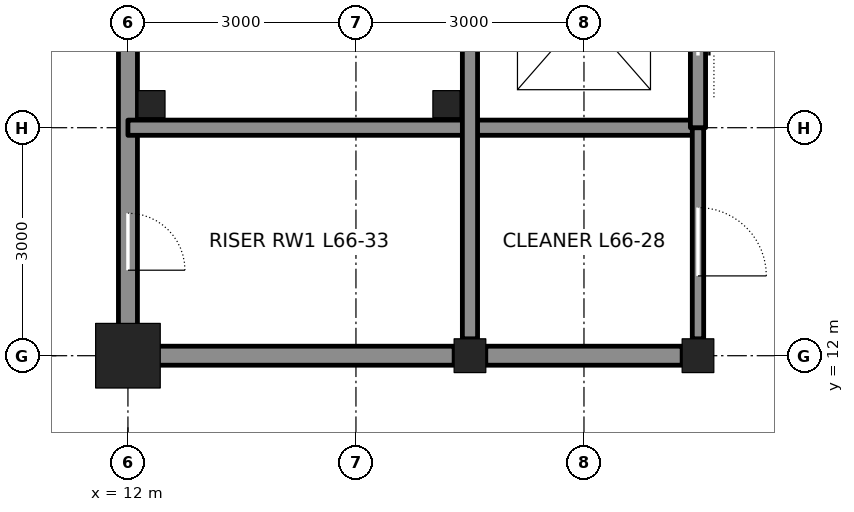
"""IFC4 building model, lengths in metres.
Left out: names, types, materials, properties, quantities, classifications, styles, units other than length and angle.
Written with IfcOpenShell. Run it as: python <this file> out.ifc"""

import sys

from ifc_helpers import new_model, si_unit, direction, frame, frame_2d, origin, origin_2d, place, context, subcontext, project, spatial, rectangle, hollow_rectangle, i_section, extrude, element, fill, save


model = new_model("IFC4")
c1 = context("Model", 3, precision=1e-05, world=origin(), true_north=direction((0.0, 1.0)))
c2 = subcontext(c1, "Body", "Model", "MODEL_VIEW")
j1 = project(units=[si_unit("LENGTHUNIT", "METRE"), si_unit("PLANEANGLEUNIT", "RADIAN")], contexts=[c1])
p1 = place(None, origin())
s1 = spatial("IfcSite", under=j1, at=p1, CompositionType="ELEMENT")
p2 = place(p1, origin())
s2 = spatial("IfcBuilding", under=s1, at=p2, CompositionType="ELEMENT")
p3 = place(p2, frame((0.0, 0.0, 295.8)))
s3 = spatial("IfcBuildingStorey", under=s2, at=p3, CompositionType="ELEMENT", Elevation=295.8)
p4 = place(p3, frame((12.0, 12.0, 0.0), z_axis=(0.0, 0.0, 1.0), x_axis=(1.0, 0.0, 0.0)))
e1 = element("IfcColumn", 1, at=p4, inside=s3, PredefinedType="COLUMN", context=c2, shape_type="SweptSolid", body=[
    extrude(hollow_rectangle(XDim=0.85, YDim=0.85, WallThickness=0.085, at=origin_2d()), origin(), (0.0, 0.0, 1.0), 4.2),
])
for number, where, z_axis, x_axis in (
    (2, (16.5, 12.0, 0.0), (0.0, 0.0, 1.0), (1.0, 0.0, 0.0)),
    (3, (19.5, 12.0, 0.0), (0.0, 0.0, 1.0), (1.0, 0.0, 0.0)),
):
    element("IfcColumn", number, at=place(p3, frame(where, z_axis=z_axis, x_axis=x_axis)), inside=s3, PredefinedType="COLUMN", context=c2, shape_type="SweptSolid", body=[
        extrude(i_section(OverallWidth=0.417, OverallDepth=0.445, WebThickness=0.039, FlangeThickness=0.063, at=origin_2d()), origin(), (0.0, 0.0, 1.0), 4.2),
    ])
p5 = place(p3, frame((12.0, 12.25, 0.0), z_axis=(0.0, 0.0, 1.0), x_axis=(0.0, 1.0, 0.0)))
e4 = element("IfcWall", 4, at=p5, inside=s3, PredefinedType="SOLIDWALL", context=c2, shape_type="SweptSolid", body=[
    extrude(rectangle(XDim=8.528, YDim=0.25, at=frame_2d((4.264, 0.0))), origin(), (0.0, 0.0, 1.0), 3.113),
])
p6 = place(p5, frame((0.875, 0.0, 0.0)))
e5 = element("IfcOpeningElement", 5, at=p6, cuts=e4, PredefinedType="OPENING", context=c2, shape_type="SweptSolid", body=[
    extrude(rectangle(XDim=0.75, YDim=2.1, at=frame_2d((0.375, 1.05))), frame((0.0, 0.135, 0.0), z_axis=(0.0, -1.0, 0.0), x_axis=(1.0, 0.0, 0.0)), (0.0, 0.0, 1.0), 0.27),
])
p7 = place(p3, frame((12.25, 12.0, 0.0), z_axis=(0.0, 0.0, 1.0), x_axis=(1.0, 0.0, 0.0)))
e6 = element("IfcWall", 6, at=p7, inside=s3, PredefinedType="SOLIDWALL", context=c2, shape_type="SweptSolid", body=[
    extrude(rectangle(XDim=4.042, YDim=0.25, at=frame_2d((2.021, 0.0))), origin(), (0.0, 0.0, 1.0), 3.181),
])
p8 = place(p3, frame((16.708, 12.0, 0.0), z_axis=(0.0, 0.0, 1.0), x_axis=(1.0, 0.0, 0.0)))
e7 = element("IfcWall", 7, at=p8, inside=s3, PredefinedType="SOLIDWALL", context=c2, shape_type="SweptSolid", body=[
    extrude(rectangle(XDim=2.583, YDim=0.25, at=frame_2d((1.292, 0.0))), origin(), (0.0, 0.0, 1.0), 3.181),
])
p9 = place(p3, frame((12.0, 15.0, 0.0), z_axis=(0.0, 0.0, 1.0), x_axis=(1.0, 0.0, 0.0)))
e8 = element("IfcWall", 8, at=p9, inside=s3, PredefinedType="SOLIDWALL", context=c2, shape_type="SweptSolid", body=[
    extrude(rectangle(XDim=7.5, YDim=0.2, at=frame_2d((3.75, 0.0))), origin(), (0.0, 0.0, 1.0), 4.04),
])
p10 = place(p3, frame((16.5, 12.222, 0.0), z_axis=(0.0, 0.0, 1.0), x_axis=(0.0, 1.0, 0.0)))
e9 = element("IfcWall", 9, at=p10, inside=s3, PredefinedType="SOLIDWALL", context=c2, shape_type="SweptSolid", body=[
    extrude(rectangle(XDim=8.555, YDim=0.2, at=frame_2d((4.278, 0.0))), origin(), (0.0, 0.0, 1.0), 3.113),
])
p11 = place(p3, frame((19.5, 12.222, 0.0), z_axis=(0.0, 0.0, 1.0), x_axis=(0.0, 1.0, 0.0)))
e10 = element("IfcWall", 10, at=p11, inside=s3, PredefinedType="PARTITIONING", context=c2, shape_type="SweptSolid", body=[
    extrude(rectangle(XDim=2.778, YDim=0.15, at=frame_2d((1.389, 0.0))), origin(), (0.0, 0.0, 1.0), 3.064),
])
p12 = place(p11, frame((0.828, 0.0, 0.0)))
e11 = element("IfcOpeningElement", 11, at=p12, cuts=e10, PredefinedType="OPENING", context=c2, shape_type="SweptSolid", body=[
    extrude(rectangle(XDim=0.9, YDim=2.1, at=frame_2d((0.45, 1.05))), frame((0.0, 0.085, 0.0), z_axis=(0.0, -1.0, 0.0), x_axis=(1.0, 0.0, 0.0)), (0.0, 0.0, 1.0), 0.17),
])
p13 = place(p3, frame((19.5, 15.0, 0.0), z_axis=(0.0, 0.0, 1.0), x_axis=(0.0, 1.0, 0.0)))
e12 = element("IfcWall", 12, at=p13, inside=s3, PredefinedType="SOLIDWALL", context=c2, shape_type="SweptSolid", body=[
    extrude(rectangle(XDim=12.0, YDim=0.2, at=frame_2d((6.0, 0.0))), origin(), (0.0, 0.0, 1.0), 3.064),
])
p14 = place(p13, frame((0.95, 0.0, 0.0)))
e13 = element("IfcOpeningElement", 13, at=p14, cuts=e12, PredefinedType="OPENING", context=c2, shape_type="SweptSolid", body=[
    extrude(rectangle(XDim=1.1, YDim=2.1, at=frame_2d((0.55, 1.05))), frame((0.0, 0.11, 0.0), z_axis=(0.0, -1.0, 0.0), x_axis=(1.0, 0.0, 0.0)), (0.0, 0.0, 1.0), 0.22),
])
p15 = place(p13, frame((3.95, 0.0, 0.0)))
e14 = element("IfcOpeningElement", 14, at=p15, cuts=e12, PredefinedType="OPENING", context=c2, shape_type="SweptSolid", body=[
    extrude(rectangle(XDim=1.1, YDim=2.1, at=frame_2d((0.55, 1.05))), frame((0.0, 0.11, 0.0), z_axis=(0.0, -1.0, 0.0), x_axis=(1.0, 0.0, 0.0)), (0.0, 0.0, 1.0), 0.22),
])
p16 = place(p13, frame((6.95, 0.0, 0.0)))
e15 = element("IfcOpeningElement", 15, at=p16, cuts=e12, PredefinedType="OPENING", context=c2, shape_type="SweptSolid", body=[
    extrude(rectangle(XDim=1.1, YDim=2.1, at=frame_2d((0.55, 1.05))), frame((0.0, 0.11, 0.0), z_axis=(0.0, -1.0, 0.0), x_axis=(1.0, 0.0, 0.0)), (0.0, 0.0, 1.0), 0.22),
])
p17 = place(p13, frame((9.95, 0.0, 0.0)))
e16 = element("IfcOpeningElement", 16, at=p17, cuts=e12, PredefinedType="OPENING", context=c2, shape_type="SweptSolid", body=[
    extrude(rectangle(XDim=1.1, YDim=2.1, at=frame_2d((0.55, 1.05))), frame((0.0, 0.11, 0.0), z_axis=(0.0, -1.0, 0.0), x_axis=(1.0, 0.0, 0.0)), (0.0, 0.0, 1.0), 0.22),
])
for number, where, z_axis, x_axis in (
    (17, (12.31, 15.31, 0.0), (0.0, 0.0, 1.0), (1.0, 0.0, 0.0)),
    (18, (16.19, 15.31, 0.0), (0.0, 0.0, 1.0), (1.0, 0.0, 0.0)),
):
    element("IfcColumn", number, at=place(p3, frame(where, z_axis=z_axis, x_axis=x_axis)), inside=s3, PredefinedType="COLUMN", context=c2, shape_type="SweptSolid", body=[
        extrude(hollow_rectangle(XDim=0.356, YDim=0.356, WallThickness=0.009, at=origin_2d()), origin(), (0.0, 0.0, 1.0), 4.2),
    ])
p18 = place(p6, frame((0.75, 0.0, 0.0), z_axis=(0.0, 0.0, 1.0), x_axis=(-1.0, 0.0, 0.0)))
e19 = element("IfcDoor", 19, at=p18, inside=s3, OperationType="SINGLE_SWING_RIGHT", PredefinedType="DOOR", context=c2, shape_type="SweptSolid", body=[
    extrude(rectangle(XDim=0.75, YDim=2.1, at=frame_2d((0.375, 1.05))), frame((0.0, 0.025, 0.0), z_axis=(0.0, -1.0, 0.0), x_axis=(1.0, 0.0, 0.0)), (0.0, 0.0, 1.0), 0.05),
])
fill(e5, e19)
p19 = place(p12, frame((0.9, 0.0, 0.0), z_axis=(0.0, 0.0, 1.0), x_axis=(-1.0, 0.0, 0.0)))
e20 = element("IfcDoor", 20, at=p19, inside=s3, OperationType="SINGLE_SWING_RIGHT", PredefinedType="DOOR", context=c2, shape_type="SweptSolid", body=[
    extrude(rectangle(XDim=0.9, YDim=2.1, at=frame_2d((0.45, 1.05))), frame((0.0, 0.025, 0.0), z_axis=(0.0, -1.0, 0.0), x_axis=(1.0, 0.0, 0.0)), (0.0, 0.0, 1.0), 0.05),
])
fill(e11, e20)
p20 = place(p14, origin())
e21 = element("IfcDoor", 21, at=p20, inside=s3, OperationType="DOUBLE_DOOR_SLIDING", PredefinedType="DOOR", context=c2, shape_type="SweptSolid", body=[
    extrude(rectangle(XDim=1.1, YDim=2.1, at=frame_2d((0.55, 1.05))), frame((0.0, 0.025, 0.0), z_axis=(0.0, -1.0, 0.0), x_axis=(1.0, 0.0, 0.0)), (0.0, 0.0, 1.0), 0.05),
])
fill(e13, e21)
save(model, sys.argv[1])
